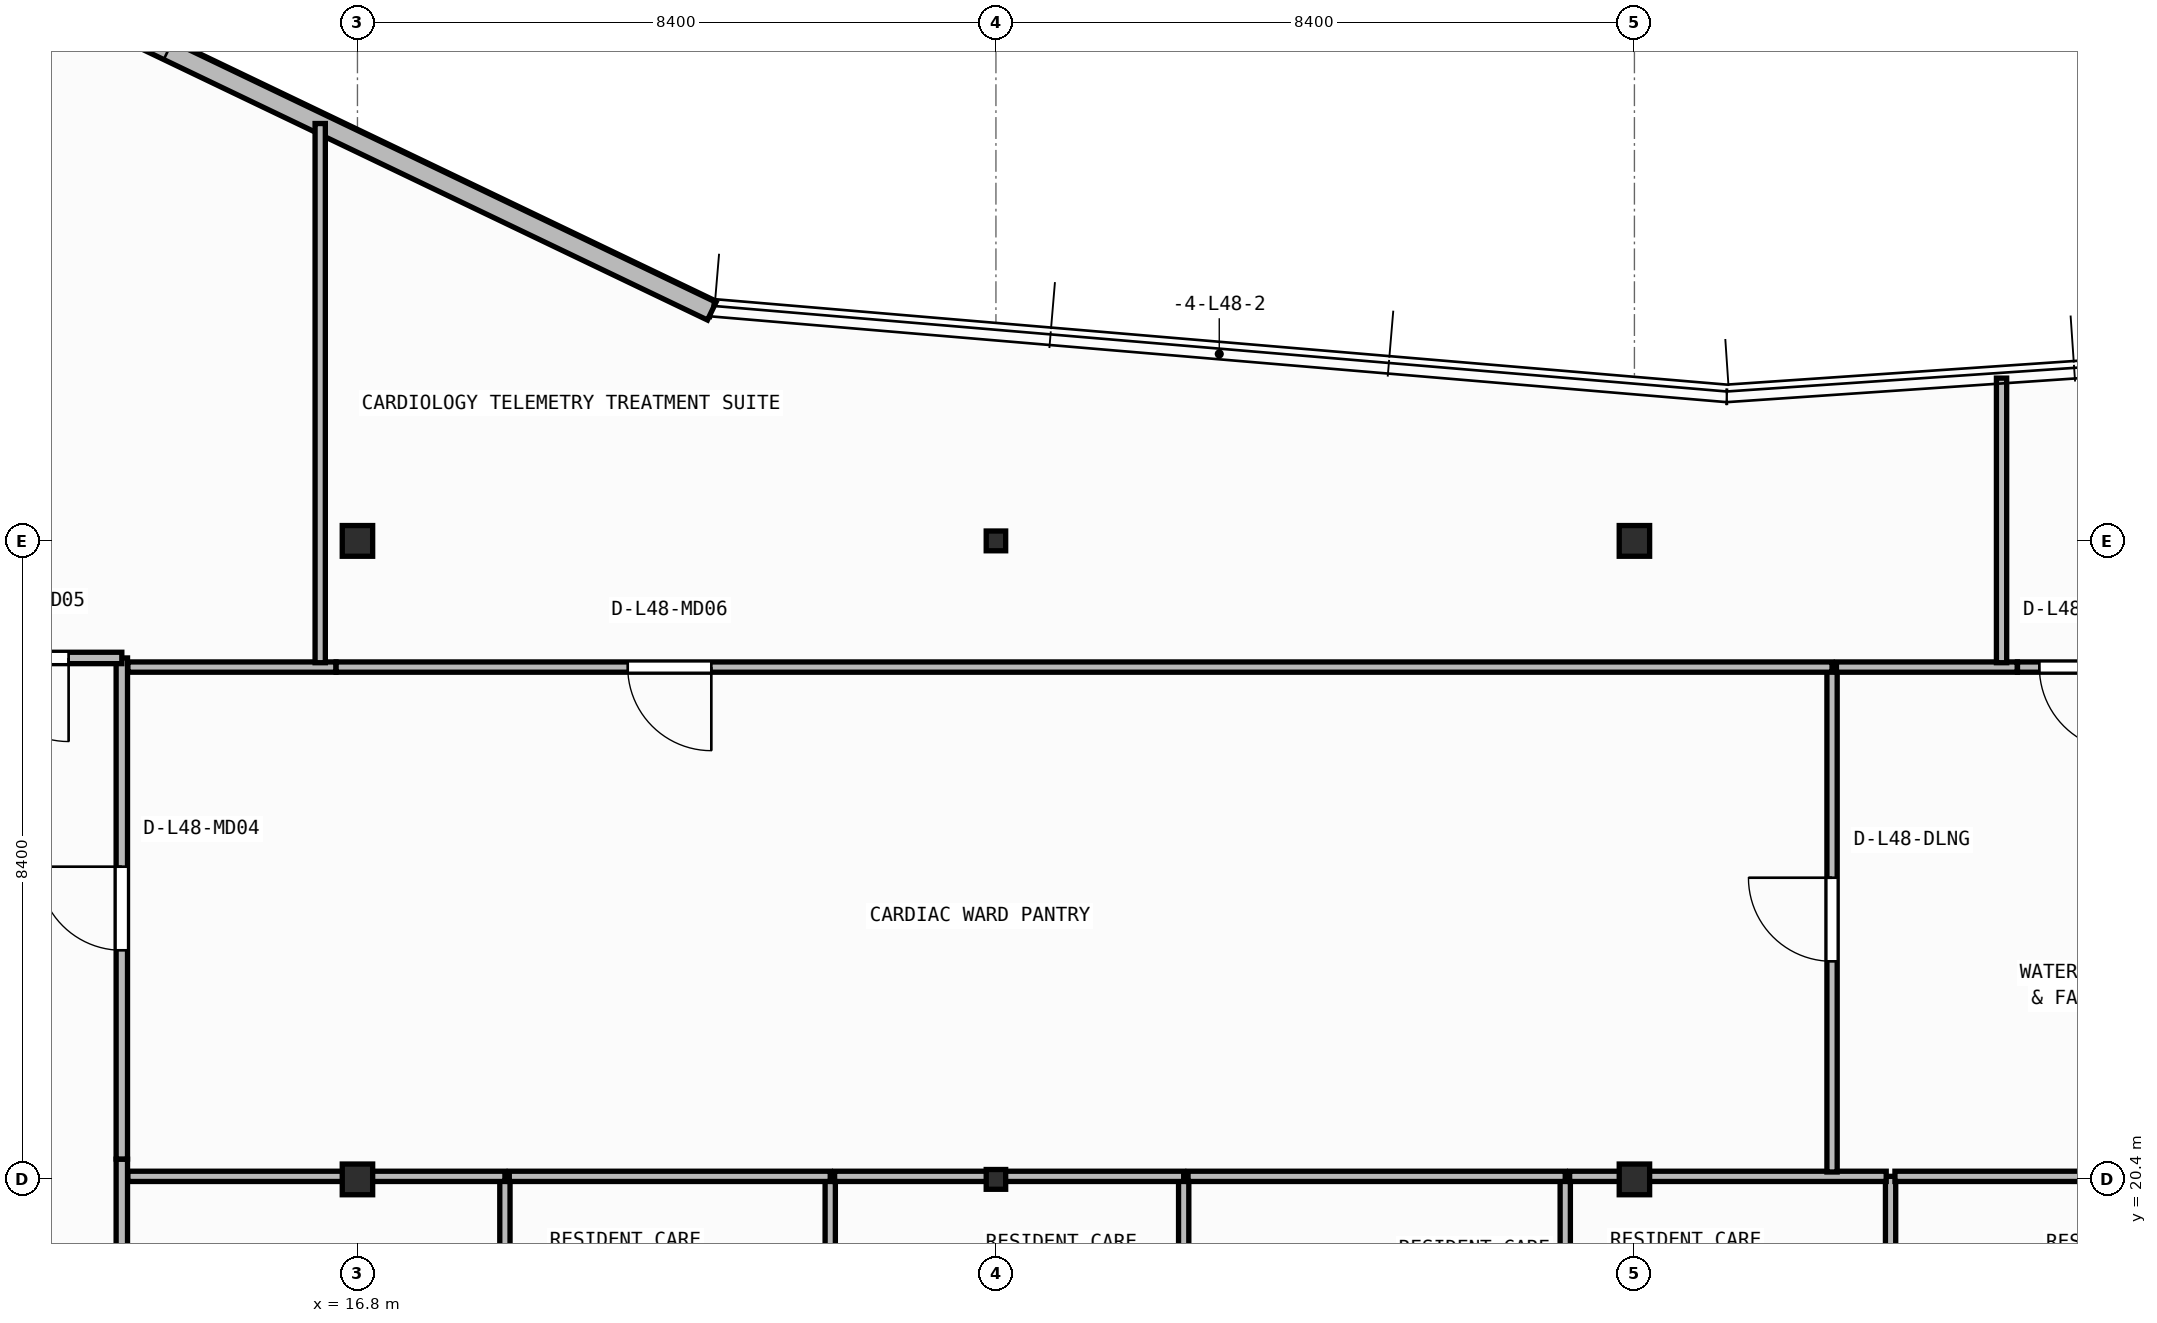
"""IFC4 building model, lengths in metres.
Left out: names, types, materials, properties, quantities, classifications, styles, units other than length and angle.
Written with IfcOpenShell. Run it as: python <this file> out.ifc"""

import sys

from ifc_helpers import new_model, si_unit, direction, frame, frame_2d, origin, origin_2d, place, context, subcontext, project, spatial, rectangle, i_section, extrude, element, fill, save


model = new_model("IFC4")
c1 = context("Model", 3, precision=1e-05, world=origin(), true_north=direction((0.0, 1.0)))
c2 = subcontext(c1, "Body", "Model", "MODEL_VIEW")
j1 = project(units=[si_unit("LENGTHUNIT", "METRE"), si_unit("PLANEANGLEUNIT", "RADIAN")], contexts=[c1])
p1 = place(None, origin())
s1 = spatial("IfcSite", under=j1, at=p1, CompositionType="ELEMENT")
p2 = place(p1, origin())
s2 = spatial("IfcBuilding", under=s1, at=p2, CompositionType="ELEMENT")
p3 = place(p2, frame((0.0, 0.0, 196.05)))
s3 = spatial("IfcBuildingStorey", under=s2, at=p3, CompositionType="ELEMENT", Elevation=196.05)
p4 = place(p3, frame((16.8, 20.4, 0.0), z_axis=(0.0, 0.0, 1.0), x_axis=(1.0, 0.0, 0.0)))
e1 = element("IfcColumn", 1, at=p4, inside=s3, PredefinedType="COLUMN", context=c2, shape_type="SweptSolid", body=[
    extrude(i_section(OverallWidth=0.4, OverallDepth=0.404, WebThickness=0.02, FlangeThickness=0.032, at=origin_2d()), origin(), (0.0, 0.0, 1.0), 3.95),
])
p5 = place(p3, frame((25.2, 20.4, 0.0), z_axis=(0.0, 0.0, 1.0), x_axis=(1.0, 0.0, 0.0)))
e2 = element("IfcColumn", 2, at=p5, inside=s3, PredefinedType="COLUMN", context=c2, shape_type="SweptSolid", body=[
    extrude(i_section(OverallWidth=0.256, OverallDepth=0.26, WebThickness=0.01, FlangeThickness=0.017, FilletRadius=0.013, at=origin_2d()), origin(), (0.0, 0.0, 1.0), 3.95),
])
for number, where, z_axis, x_axis in (
    (3, (33.6, 20.4, 0.0), (0.0, 0.0, 1.0), (1.0, 0.0, 0.0)),
    (4, (16.8, 28.8, 0.0), (0.0, 0.0, 1.0), (1.0, 0.0, 0.0)),
):
    element("IfcColumn", number, at=place(p3, frame(where, z_axis=z_axis, x_axis=x_axis)), inside=s3, PredefinedType="COLUMN", context=c2, shape_type="SweptSolid", body=[
        extrude(i_section(OverallWidth=0.4, OverallDepth=0.404, WebThickness=0.02, FlangeThickness=0.032, at=origin_2d()), origin(), (0.0, 0.0, 1.0), 3.95),
    ])
p6 = place(p3, frame((25.2, 28.8, 0.0), z_axis=(0.0, 0.0, 1.0), x_axis=(1.0, 0.0, 0.0)))
e5 = element("IfcColumn", 5, at=p6, inside=s3, PredefinedType="COLUMN", context=c2, shape_type="SweptSolid", body=[
    extrude(i_section(OverallWidth=0.256, OverallDepth=0.26, WebThickness=0.01, FlangeThickness=0.017, FilletRadius=0.013, at=origin_2d()), origin(), (0.0, 0.0, 1.0), 3.95),
])
p7 = place(p3, frame((33.6, 28.8, 0.0), z_axis=(0.0, 0.0, 1.0), x_axis=(1.0, 0.0, 0.0)))
e6 = element("IfcColumn", 6, at=p7, inside=s3, PredefinedType="COLUMN", context=c2, shape_type="SweptSolid", body=[
    extrude(i_section(OverallWidth=0.4, OverallDepth=0.404, WebThickness=0.02, FlangeThickness=0.032, at=origin_2d()), origin(), (0.0, 0.0, 1.0), 3.95),
])
p8 = place(p3, frame((21.461, 31.823, 0.0), z_axis=(0.0, 0.0, 1.0), x_axis=(-0.901858094827, 0.432032379336, 0.0)))
e7 = element("IfcWall", 7, at=p8, inside=s3, PredefinedType="STANDARD", context=c2, shape_type="SweptSolid", body=[
    extrude(rectangle(XDim=12.532, YDim=0.26, at=frame_2d((6.266, 0.0))), origin(), (0.0, 0.0, 1.0), 3.71),
])
p9 = place(p8, frame((7.932, 0.0, 0.9)))
e8 = element("IfcOpeningElement", 8, at=p9, cuts=e7, PredefinedType="OPENING", context=c2, shape_type="SweptSolid", body=[
    extrude(rectangle(XDim=2.4, YDim=1.65, at=frame_2d((1.2, 0.825))), frame((0.0, 0.14, 0.0), z_axis=(0.0, -1.0, 0.0), x_axis=(1.0, 0.0, 0.0)), (0.0, 0.0, 1.0), 0.28),
])
p10 = place(p3, frame((13.7, 17.814, 0.0), z_axis=(0.0, 0.0, 1.0), x_axis=(0.0, 1.0, 0.0)))
e9 = element("IfcWall", 9, at=p10, inside=s3, PredefinedType="PARTITIONING", context=c2, shape_type="SweptSolid", body=[
    extrude(rectangle(XDim=2.852, YDim=0.15, at=frame_2d((1.426, 0.0))), origin(), (0.0, 0.0, 1.0), 3.71),
])
p11 = place(p3, frame((13.7, 20.668, 0.0), z_axis=(0.0, 0.0, 1.0), x_axis=(0.0, 1.0, 0.0)))
e10 = element("IfcWall", 10, at=p11, inside=s3, PredefinedType="PARTITIONING", context=c2, shape_type="SweptSolid", body=[
    extrude(rectangle(XDim=6.592, YDim=0.15, at=frame_2d((3.296, 0.0))), origin(), (0.0, 0.0, 1.0), 3.71),
])
p12 = place(p11, frame((2.746, 0.0, 0.0)))
e11 = element("IfcOpeningElement", 11, at=p12, cuts=e10, PredefinedType="OPENING", context=c2, shape_type="SweptSolid", body=[
    extrude(rectangle(XDim=1.1, YDim=2.1, at=frame_2d((0.55, 1.05))), frame((0.0, 0.085, 0.0), z_axis=(0.0, -1.0, 0.0), x_axis=(1.0, 0.0, 0.0)), (0.0, 0.0, 1.0), 0.17),
])
p13 = place(p3, frame((13.7, 27.26, 0.0), z_axis=(0.0, 0.0, 1.0), x_axis=(-1.0, 0.0, 0.0)))
e12 = element("IfcWall", 12, at=p13, inside=s3, PredefinedType="PARTITIONING", context=c2, shape_type="SweptSolid", body=[
    extrude(rectangle(XDim=2.5, YDim=0.15, at=frame_2d((1.25, 0.0))), origin(), (0.0, 0.0, 1.0), 3.71),
])
p14 = place(p13, frame((0.7, 0.0, 0.0)))
e13 = element("IfcOpeningElement", 13, at=p14, cuts=e12, PredefinedType="OPENING", context=c2, shape_type="SweptSolid", body=[
    extrude(rectangle(XDim=1.1, YDim=2.1, at=frame_2d((0.55, 1.05))), frame((0.0, 0.085, 0.0), z_axis=(0.0, -1.0, 0.0), x_axis=(1.0, 0.0, 0.0)), (0.0, 0.0, 1.0), 0.17),
])
p15 = place(p3, frame((18.74, 17.833, 0.0), z_axis=(0.0, 0.0, 1.0), x_axis=(0.0, 1.0, 0.0)))
e14 = element("IfcWall", 14, at=p15, inside=s3, PredefinedType="PARTITIONING", context=c2, shape_type="SweptSolid", body=[
    extrude(rectangle(XDim=2.607, YDim=0.135, at=frame_2d((1.304, 0.0))), origin(), (0.0, 0.0, 1.0), 3.71),
])
p16 = place(p3, frame((18.74, 20.44, 0.0), z_axis=(0.0, 0.0, 1.0), x_axis=(-1.0, 0.0, 0.0)))
e15 = element("IfcWall", 15, at=p16, inside=s3, PredefinedType="PARTITIONING", context=c2, shape_type="SweptSolid", body=[
    extrude(rectangle(XDim=4.96, YDim=0.135, at=frame_2d((2.48, 0.0))), origin(), (0.0, 0.0, 1.0), 3.152),
])
p17 = place(p3, frame((23.02, 17.833, 0.0), z_axis=(0.0, 0.0, 1.0), x_axis=(0.0, 1.0, 0.0)))
e16 = element("IfcWall", 16, at=p17, inside=s3, PredefinedType="PARTITIONING", context=c2, shape_type="SweptSolid", body=[
    extrude(rectangle(XDim=2.607, YDim=0.135, at=frame_2d((1.304, 0.0))), origin(), (0.0, 0.0, 1.0), 3.71),
])
p18 = place(p3, frame((23.02, 20.44, 0.0), z_axis=(0.0, 0.0, 1.0), x_axis=(-1.0, 0.0, 0.0)))
e17 = element("IfcWall", 17, at=p18, inside=s3, PredefinedType="PARTITIONING", context=c2, shape_type="SweptSolid", body=[
    extrude(rectangle(XDim=4.222, YDim=0.135, at=frame_2d((2.111, 0.0))), origin(), (0.0, 0.0, 1.0), 3.152),
])
p19 = place(p3, frame((27.67, 17.833, 0.0), z_axis=(0.0, 0.0, 1.0), x_axis=(0.0, 1.0, 0.0)))
e18 = element("IfcWall", 18, at=p19, inside=s3, PredefinedType="PARTITIONING", context=c2, shape_type="SweptSolid", body=[
    extrude(rectangle(XDim=2.607, YDim=0.135, at=frame_2d((1.304, 0.0))), origin(), (0.0, 0.0, 1.0), 3.71),
])
p20 = place(p3, frame((27.67, 20.44, 0.0), z_axis=(0.0, 0.0, 1.0), x_axis=(-1.0, 0.0, 0.0)))
e19 = element("IfcWall", 19, at=p20, inside=s3, PredefinedType="PARTITIONING", context=c2, shape_type="SweptSolid", body=[
    extrude(rectangle(XDim=4.593, YDim=0.135, at=frame_2d((2.296, 0.0))), origin(), (0.0, 0.0, 1.0), 3.152),
])
p21 = place(p3, frame((32.69, 17.833, 0.0), z_axis=(0.0, 0.0, 1.0), x_axis=(0.0, 1.0, 0.0)))
e20 = element("IfcWall", 20, at=p21, inside=s3, PredefinedType="PARTITIONING", context=c2, shape_type="SweptSolid", body=[
    extrude(rectangle(XDim=2.607, YDim=0.135, at=frame_2d((1.304, 0.0))), origin(), (0.0, 0.0, 1.0), 3.71),
])
p22 = place(p3, frame((32.69, 20.44, 0.0), z_axis=(0.0, 0.0, 1.0), x_axis=(-1.0, 0.0, 0.0)))
e21 = element("IfcWall", 21, at=p22, inside=s3, PredefinedType="PARTITIONING", context=c2, shape_type="SweptSolid", body=[
    extrude(rectangle(XDim=4.962, YDim=0.135, at=frame_2d((2.481, 0.0))), origin(), (0.0, 0.0, 1.0), 3.152),
])
p23 = place(p3, frame((36.97, 17.833, 0.0), z_axis=(0.0, 0.0, 1.0), x_axis=(0.0, 1.0, 0.0)))
e22 = element("IfcWall", 22, at=p23, inside=s3, PredefinedType="PARTITIONING", context=c2, shape_type="SweptSolid", body=[
    extrude(rectangle(XDim=2.607, YDim=0.135, at=frame_2d((1.304, 0.0))), origin(), (0.0, 0.0, 1.0), 3.71),
])
p24 = place(p3, frame((36.913, 20.44, 0.0), z_axis=(0.0, 0.0, 1.0), x_axis=(-1.0, 0.0, 0.0)))
e23 = element("IfcWall", 23, at=p24, inside=s3, PredefinedType="PARTITIONING", context=c2, shape_type="SweptSolid", body=[
    extrude(rectangle(XDim=4.165, YDim=0.135, at=frame_2d((2.083, 0.0))), origin(), (0.0, 0.0, 1.0), 3.152),
])
p25 = place(p3, frame((41.62, 20.44, 0.0), z_axis=(0.0, 0.0, 1.0), x_axis=(-1.0, 0.0, 0.0)))
e24 = element("IfcWall", 24, at=p25, inside=s3, PredefinedType="PARTITIONING", context=c2, shape_type="SweptSolid", body=[
    extrude(rectangle(XDim=4.593, YDim=0.135, at=frame_2d((2.296, 0.0))), origin(), (0.0, 0.0, 1.0), 3.152),
])
p26 = place(p3, frame((36.2, 20.498, 0.0), z_axis=(0.0, 0.0, 1.0), x_axis=(0.0, 1.0, 0.0)))
e25 = element("IfcWall", 25, at=p26, inside=s3, PredefinedType="PARTITIONING", context=c2, shape_type="SweptSolid", body=[
    extrude(rectangle(XDim=6.642, YDim=0.135, at=frame_2d((3.321, 0.0))), origin(), (0.0, 0.0, 1.0), 3.71),
])
p27 = place(p26, frame((2.771, 0.0, 0.0)))
e26 = element("IfcOpeningElement", 26, at=p27, cuts=e25, PredefinedType="OPENING", context=c2, shape_type="SweptSolid", body=[
    extrude(rectangle(XDim=1.1, YDim=2.1, at=frame_2d((0.55, 1.05))), frame((0.0, 0.077, 0.0), z_axis=(0.0, -1.0, 0.0), x_axis=(1.0, 0.0, 0.0)), (0.0, 0.0, 1.0), 0.155),
])
p28 = place(p3, frame((16.518, 27.14, 0.0), z_axis=(0.0, 0.0, 1.0), x_axis=(-1.0, 0.0, 0.0)))
e27 = element("IfcWall", 27, at=p28, inside=s3, PredefinedType="PARTITIONING", context=c2, shape_type="SweptSolid", body=[
    extrude(rectangle(XDim=2.738, YDim=0.135, at=frame_2d((1.369, 0.0))), origin(), (0.0, 0.0, 1.0), 3.71),
])
p29 = place(p3, frame((36.2, 27.14, 0.0), z_axis=(0.0, 0.0, 1.0), x_axis=(-1.0, 0.0, 0.0)))
e28 = element("IfcWall", 28, at=p29, inside=s3, PredefinedType="PARTITIONING", context=c2, shape_type="SweptSolid", body=[
    extrude(rectangle(XDim=19.68, YDim=0.135, at=frame_2d((9.84, 0.0))), origin(), (0.0, 0.0, 1.0), 3.71),
])
p30 = place(p29, frame((14.744, 0.0, 0.0)))
e29 = element("IfcOpeningElement", 29, at=p30, cuts=e28, PredefinedType="OPENING", context=c2, shape_type="SweptSolid", body=[
    extrude(rectangle(XDim=1.1, YDim=2.1, at=frame_2d((0.55, 1.05))), frame((0.0, 0.077, 0.0), z_axis=(0.0, -1.0, 0.0), x_axis=(1.0, 0.0, 0.0)), (0.0, 0.0, 1.0), 0.155),
])
p31 = place(p3, frame((38.637, 27.14, 0.0), z_axis=(0.0, 0.0, 1.0), x_axis=(-1.0, 0.0, 0.0)))
e30 = element("IfcWall", 30, at=p31, inside=s3, PredefinedType="PARTITIONING", context=c2, shape_type="SweptSolid", body=[
    extrude(rectangle(XDim=2.38, YDim=0.135, at=frame_2d((1.19, 0.0))), origin(), (0.0, 0.0, 1.0), 3.71),
])
p32 = place(p3, frame((43.66, 27.14, 0.0), z_axis=(0.0, 0.0, 1.0), x_axis=(-1.0, 0.0, 0.0)))
e31 = element("IfcWall", 31, at=p32, inside=s3, PredefinedType="PARTITIONING", context=c2, shape_type="SweptSolid", body=[
    extrude(rectangle(XDim=5.021, YDim=0.135, at=frame_2d((2.51, 0.0))), origin(), (0.0, 0.0, 1.0), 3.71),
])
p33 = place(p32, frame((3.633, 0.0, 0.0)))
e32 = element("IfcOpeningElement", 32, at=p33, cuts=e31, PredefinedType="OPENING", context=c2, shape_type="SweptSolid", body=[
    extrude(rectangle(XDim=1.1, YDim=2.1, at=frame_2d((0.55, 1.05))), frame((0.0, 0.077, 0.0), z_axis=(0.0, -1.0, 0.0), x_axis=(1.0, 0.0, 0.0)), (0.0, 0.0, 1.0), 0.155),
])
p34 = place(p3, frame((16.31, 27.198, 0.0), z_axis=(0.0, 0.0, 1.0), x_axis=(0.0, 1.0, 0.0)))
e33 = element("IfcWall", 33, at=p34, inside=s3, PredefinedType="PARTITIONING", context=c2, shape_type="SweptSolid", body=[
    extrude(rectangle(XDim=7.093, YDim=0.135, at=frame_2d((3.547, 0.0))), origin(), (0.0, 0.0, 1.0), 3.152),
])
p35 = place(p3, frame((38.43, 27.198, 0.0), z_axis=(0.0, 0.0, 1.0), x_axis=(0.0, 1.0, 0.0)))
e34 = element("IfcWall", 34, at=p35, inside=s3, PredefinedType="PARTITIONING", context=c2, shape_type="SweptSolid", body=[
    extrude(rectangle(XDim=3.744, YDim=0.135, at=frame_2d((1.872, 0.0))), origin(), (0.0, 0.0, 1.0), 3.71),
])
p36 = place(p9, origin())
e35 = element("IfcWindow", 35, at=p36, inside=s3, PartitioningType="SINGLE_PANEL", PredefinedType="WINDOW", context=c2, shape_type="SweptSolid", body=[
    extrude(rectangle(XDim=2.4, YDim=1.65, at=frame_2d((1.2, 0.825))), frame((0.0, 0.03, 0.0), z_axis=(0.0, -1.0, 0.0), x_axis=(1.0, 0.0, 0.0)), (0.0, 0.0, 1.0), 0.06),
])
fill(e8, e35)
p37 = place(p12, origin())
e36 = element("IfcDoor", 36, at=p37, inside=s3, OperationType="SINGLE_SWING_RIGHT", PredefinedType="DOOR", context=c2, shape_type="SweptSolid", body=[
    extrude(rectangle(XDim=1.1, YDim=2.1, at=frame_2d((0.55, 1.05))), frame((0.0, 0.025, 0.0), z_axis=(0.0, -1.0, 0.0), x_axis=(1.0, 0.0, 0.0)), (0.0, 0.0, 1.0), 0.05),
])
fill(e11, e36)
p38 = place(p14, origin())
e37 = element("IfcDoor", 37, at=p38, inside=s3, OperationType="SINGLE_SWING_LEFT", PredefinedType="DOOR", context=c2, shape_type="SweptSolid", body=[
    extrude(rectangle(XDim=1.1, YDim=2.1, at=frame_2d((0.55, 1.05))), frame((0.0, 0.025, 0.0), z_axis=(0.0, -1.0, 0.0), x_axis=(1.0, 0.0, 0.0)), (0.0, 0.0, 1.0), 0.05),
])
fill(e13, e37)
p39 = place(p27, origin())
e38 = element("IfcDoor", 38, at=p39, inside=s3, OperationType="SINGLE_SWING_RIGHT", PredefinedType="DOOR", context=c2, shape_type="SweptSolid", body=[
    extrude(rectangle(XDim=1.1, YDim=2.1, at=frame_2d((0.55, 1.05))), frame((0.0, 0.025, 0.0), z_axis=(0.0, -1.0, 0.0), x_axis=(1.0, 0.0, 0.0)), (0.0, 0.0, 1.0), 0.05),
])
fill(e26, e38)
p40 = place(p30, origin())
e39 = element("IfcDoor", 39, at=p40, inside=s3, OperationType="SINGLE_SWING_LEFT", PredefinedType="DOOR", context=c2, shape_type="SweptSolid", body=[
    extrude(rectangle(XDim=1.1, YDim=2.1, at=frame_2d((0.55, 1.05))), frame((0.0, 0.025, 0.0), z_axis=(0.0, -1.0, 0.0), x_axis=(1.0, 0.0, 0.0)), (0.0, 0.0, 1.0), 0.05),
])
fill(e29, e39)
p41 = place(p33, origin())
e40 = element("IfcDoor", 40, at=p41, inside=s3, OperationType="SINGLE_SWING_LEFT", PredefinedType="DOOR", context=c2, shape_type="SweptSolid", body=[
    extrude(rectangle(XDim=1.1, YDim=2.1, at=frame_2d((0.55, 1.05))), frame((0.0, 0.025, 0.0), z_axis=(0.0, -1.0, 0.0), x_axis=(1.0, 0.0, 0.0)), (0.0, 0.0, 1.0), 0.05),
])
fill(e32, e40)
save(model, sys.argv[1])
